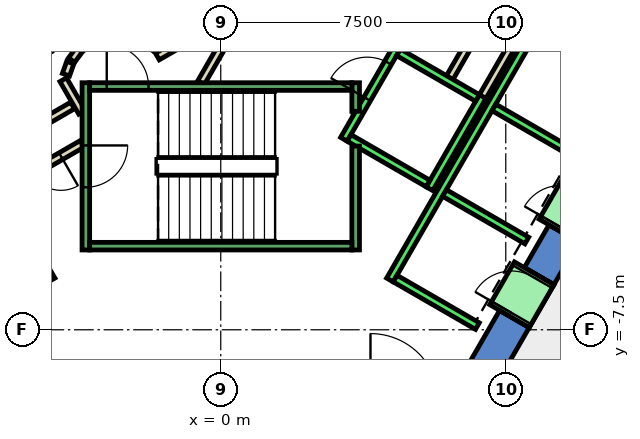
"""IFC4 building model, lengths in metres.
Left out: names, types, materials, properties, quantities, classifications, styles, units other than length and angle.
Written with IfcOpenShell. Run it as: python <this file> out.ifc"""

import sys

from ifc_helpers import new_model, si_unit, direction, frame, frame_2d, origin, place, context, subcontext, project, spatial, polyline, rectangle, outline, extrude, element, fill, save


model = new_model("IFC4")
c1 = context("Model", 3, precision=1e-05, world=origin(), true_north=direction((0.0, 1.0)))
c2 = subcontext(c1, "Body", "Model", "MODEL_VIEW")
j1 = project(units=[si_unit("LENGTHUNIT", "METRE"), si_unit("PLANEANGLEUNIT", "RADIAN")], contexts=[c1])
p1 = place(None, origin())
s1 = spatial("IfcSite", under=j1, at=p1, CompositionType="ELEMENT")
p2 = place(p1, origin())
s2 = spatial("IfcBuilding", under=s1, at=p2, CompositionType="ELEMENT")
p3 = place(p2, frame((0.0, 0.0, 95.0)))
s3 = spatial("IfcBuildingStorey", under=s2, at=p3, CompositionType="ELEMENT", Elevation=95.0)
p4 = place(p3, frame((0.0, 0.0, -0.4)))
e1 = element("IfcWall", 1, at=p4, inside=s3, PredefinedType="SHEAR", context=c2, shape_type="SweptSolid", body=[
    extrude(outline(polyline([(8.117, -7.44), (7.338, -6.99), (6.409, -8.6), (6.928, -9.5), (8.117, -7.44)])), origin(), (0.0, 0.0, 1.0), 4.2),
])
p5 = place(p3, frame((0.0, 0.0, -0.4)))
e2 = element("IfcWall", 2, at=p5, inside=s3, PredefinedType="SHEAR", context=c2, shape_type="SweptSolid", body=[
    extrude(outline(polyline([(9.417, -5.189), (8.638, -4.739), (7.988, -5.864), (8.767, -6.314), (9.417, -5.189)])), origin(), (0.0, 0.0, 1.0), 4.2),
])
p6 = place(p3, frame((0.0, 0.0, 3.6)))
e3 = element("IfcWall", 3, at=p6, inside=s3, PredefinedType="SHEAR", context=c2, shape_type="SweptSolid", body=[
    extrude(outline(polyline([(8.767, -6.314), (7.988, -5.864), (7.338, -6.99), (8.117, -7.44), (8.767, -6.314)])), origin(), (0.0, 0.0, 1.0), 0.2),
])
p7 = place(p3, frame((0.0, 0.0, 3.6)))
e4 = element("IfcWall", 4, at=p7, inside=s3, PredefinedType="SHEAR", context=c2, shape_type="SweptSolid", body=[
    extrude(outline(polyline([(10.067, -4.063), (9.288, -3.613), (8.638, -4.739), (9.417, -5.189), (10.067, -4.063)])), origin(), (0.0, 0.0, 1.0), 0.2),
])
p8 = place(p3, frame((6.826, 0.522, 0.0), z_axis=(0.0, 0.0, 1.0), x_axis=(-0.500016722714, -0.866015748706, 0.0)))
e5 = element("IfcWall", 5, at=p8, inside=s3, PredefinedType="PARTITIONING", context=c2, shape_type="SweptSolid", body=[
    extrude(rectangle(XDim=1.7, YDim=0.2, at=frame_2d((0.85, 0.0))), origin(), (0.0, 0.0, 1.0), 3.8),
])
p9 = place(p3, frame((8.192, 0.888, 0.0), z_axis=(0.0, 0.0, 1.0), x_axis=(-0.499940625693, -0.866059680843, 0.0)))
e6 = element("IfcWall", 6, at=p9, inside=s3, PredefinedType="PARTITIONING", context=c2, shape_type="SweptSolid", body=[
    extrude(rectangle(XDim=2.68, YDim=0.2, at=frame_2d((1.34, 0.0))), origin(), (0.0, 0.0, 1.0), 3.8),
])
p10 = place(p3, frame((-3.9, -1.599, 0.0), z_axis=(0.0, 0.0, 1.0), x_axis=(-0.865969445389, -0.500096910261, 0.0)))
e7 = element("IfcWall", 7, at=p10, inside=s3, PredefinedType="PARTITIONING", context=c2, shape_type="SweptSolid", body=[
    extrude(rectangle(XDim=1.373, YDim=0.2, at=frame_2d((0.687, 0.0))), origin(), (0.0, 0.0, 1.0), 3.8),
])
p11 = place(p3, frame((-3.65, -2.61, 0.0), z_axis=(0.0, 0.0, 1.0), x_axis=(-0.866072462134, -0.499918483688, 0.0)))
e8 = element("IfcWall", 8, at=p11, inside=s3, PredefinedType="PARTITIONING", context=c2, shape_type="SweptSolid", body=[
    extrude(rectangle(XDim=2.084, YDim=0.2, at=frame_2d((1.042, 0.0))), origin(), (0.0, 0.0, 1.0), 3.8),
])
p12 = place(p11, frame((0.642, 0.0, 0.0)))
e9 = element("IfcOpeningElement", 9, at=p12, cuts=e8, PredefinedType="OPENING", context=c2, shape_type="SweptSolid", body=[
    extrude(rectangle(XDim=0.9, YDim=2.1, at=frame_2d((0.45, 1.05))), frame((0.0, 0.11, 0.0), z_axis=(0.0, -1.0, 0.0), x_axis=(1.0, 0.0, 0.0)), (0.0, 0.0, 1.0), 0.22),
])
p13 = place(p3, frame((-4.145, -0.92, 0.0), z_axis=(0.0, 0.0, 1.0), x_axis=(0.499743786207, -0.866173278362, 0.0)))
e10 = element("IfcWall", 10, at=p13, inside=s3, PredefinedType="PARTITIONING", context=c2, shape_type="SweptSolid", body=[
    extrude(rectangle(XDim=0.991, YDim=0.2, at=frame_2d((0.495, 0.0))), origin(), (0.0, 0.0, 1.0), 3.8),
])
p14 = place(p3, frame((-0.52, -1.0, 0.0), z_axis=(0.0, 0.0, 1.0), x_axis=(0.50011622646, 0.865958290007, 0.0)))
e11 = element("IfcWall", 11, at=p14, inside=s3, PredefinedType="PARTITIONING", context=c2, shape_type="SweptSolid", body=[
    extrude(rectangle(XDim=4.991, YDim=0.2, at=frame_2d((2.496, 0.0))), origin(), (0.0, 0.0, 1.0), 3.8),
])
p15 = place(p14, frame((1.945, 0.0, 0.0)))
e12 = element("IfcOpeningElement", 12, at=p15, cuts=e11, PredefinedType="OPENING", context=c2, shape_type="SweptSolid", body=[
    extrude(rectangle(XDim=1.0, YDim=2.1, at=frame_2d((0.5, 1.05))), frame((0.0, 0.11, 0.0), z_axis=(0.0, -1.0, 0.0), x_axis=(1.0, 0.0, 0.0)), (0.0, 0.0, 1.0), 0.22),
])
p16 = place(p3, frame((-0.412, 0.414, 0.0), z_axis=(0.0, 0.0, 1.0), x_axis=(-0.866017369001, -0.500013916395, 0.0)))
e13 = element("IfcWall", 13, at=p16, inside=s3, PredefinedType="PARTITIONING", context=c2, shape_type="SweptSolid", body=[
    extrude(rectangle(XDim=1.45, YDim=0.2, at=frame_2d((0.725, 0.0))), origin(), (0.0, 0.0, 1.0), 3.8),
])
p17 = place(p3, frame((-3.723, -0.131, 0.0), z_axis=(0.0, 0.0, 1.0), x_axis=(-0.594675113454, -0.803966112121, 0.0)))
e14 = element("IfcWall", 14, at=p17, inside=s3, PredefinedType="PARTITIONING", context=c2, shape_type="SweptSolid", body=[
    extrude(rectangle(XDim=0.338, YDim=0.2, at=frame_2d((0.169, 0.0))), origin(), (0.0, 0.0, 1.0), 3.8),
])
p18 = place(p3, frame((-3.96, -0.47, 0.0), z_axis=(0.0, 0.0, 1.0), x_axis=(-0.334824194261, -0.942280615813, 0.0)))
e15 = element("IfcWall", 15, at=p18, inside=s3, PredefinedType="PARTITIONING", context=c2, shape_type="SweptSolid", body=[
    extrude(rectangle(XDim=0.338, YDim=0.2, at=frame_2d((0.169, 0.0))), origin(), (0.0, 0.0, 1.0), 3.8),
])
p19 = place(p3, frame((12.401, -7.621, 0.0), z_axis=(0.0, 0.0, 1.0), x_axis=(-0.499983724212, -0.866034800411, 0.0)))
e16 = element("IfcWall", 16, at=p19, inside=s3, PredefinedType="PARTITIONING", context=c2, shape_type="SweptSolid", body=[
    extrude(rectangle(XDim=9.302, YDim=0.2, at=frame_2d((4.651, 0.0))), origin(), (0.0, 0.0, 1.0), 3.8),
])
p20 = place(p3, frame((-9.751, 2.99, 0.0), z_axis=(0.0, 0.0, 1.0), x_axis=(0.50000090737, -0.866024879913, 0.0)))
e17 = element("IfcWall", 17, at=p20, inside=s3, PredefinedType="STANDARD", context=c2, shape_type="SweptSolid", body=[
    extrude(rectangle(XDim=10.6, YDim=0.2, at=frame_2d((5.3, 0.0))), origin(), (0.0, 0.0, 1.0), 3.8),
])
p21 = place(p3, frame((3.24, -2.488, 0.0), z_axis=(0.0, 0.0, 1.0), x_axis=(0.49994636267, 0.866056369097, 0.0)))
e18 = element("IfcWall", 18, at=p21, inside=s3, PredefinedType="STANDARD", context=c2, shape_type="SweptSolid", body=[
    extrude(rectangle(XDim=2.8, YDim=0.2, at=frame_2d((1.4, 0.0))), origin(), (0.0, 0.0, 1.0), 3.8),
])
p22 = place(p21, frame((1.225, 0.0, 0.0)))
e19 = element("IfcOpeningElement", 19, at=p22, cuts=e18, PredefinedType="OPENING", context=c2, shape_type="SweptSolid", body=[
    extrude(rectangle(XDim=1.1, YDim=2.1, at=frame_2d((0.55, 1.05))), frame((0.0, 0.11, 0.0), z_axis=(0.0, -1.0, 0.0), x_axis=(1.0, 0.0, 0.0)), (0.0, 0.0, 1.0), 0.22),
])
p23 = place(p3, frame((5.492, -3.788, 0.0), z_axis=(0.0, 0.0, 1.0), x_axis=(0.500011755427, 0.866018616679, 0.0)))
e20 = element("IfcWall", 20, at=p23, inside=s3, PredefinedType="STANDARD", context=c2, shape_type="SweptSolid", body=[
    extrude(rectangle(XDim=2.8, YDim=0.2, at=frame_2d((1.4, 0.0))), origin(), (0.0, 0.0, 1.0), 3.8),
])
p24 = place(p3, frame((3.377, -2.452, 0.0), z_axis=(0.0, 0.0, 1.0), x_axis=(0.865955154139, -0.50012165622, 0.0)))
e21 = element("IfcWall", 21, at=p24, inside=s3, PredefinedType="STANDARD", context=c2, shape_type="SweptSolid", body=[
    extrude(rectangle(XDim=2.4, YDim=0.2, at=frame_2d((1.2, 0.0))), origin(), (0.0, 0.0, 1.0), 3.8),
])
p25 = place(p3, frame((4.677, -0.2, 0.0), z_axis=(0.0, 0.0, 1.0), x_axis=(0.865973769406, -0.500089422704, 0.0)))
e22 = element("IfcWall", 22, at=p25, inside=s3, PredefinedType="STANDARD", context=c2, shape_type="SweptSolid", body=[
    extrude(rectangle(XDim=2.399, YDim=0.2, at=frame_2d((1.2, 0.0))), origin(), (0.0, 0.0, 1.0), 3.8),
])
p26 = place(p3, frame((4.451, -6.19, 0.0), z_axis=(0.0, 0.0, 1.0), x_axis=(0.50000090737, 0.866024879913, 0.0)))
e23 = element("IfcWall", 23, at=p26, inside=s3, PredefinedType="STANDARD", context=c2, shape_type="SweptSolid", body=[
    extrude(rectangle(XDim=10.6, YDim=0.2, at=frame_2d((5.3, 0.0))), origin(), (0.0, 0.0, 1.0), 3.8),
])
for number, where, z_axis, x_axis in (
    (24, (4.588, -6.153, 0.0), (0.0, 0.0, 1.0), (0.866, -0.5, 0.0)),
    (25, (5.888, -3.902, 0.0), (0.0, 0.0, 1.0), (0.866, -0.5, 0.0)),
    (26, (7.188, -1.65, 0.0), (0.0, 0.0, 1.0), (0.866, -0.5, 0.0)),
    (27, (8.488, 0.602, 0.0), (0.0, 0.0, 1.0), (0.866, -0.5, 0.0)),
):
    element("IfcWall", number, at=place(p3, frame(where, z_axis=z_axis, x_axis=x_axis)), inside=s3, PredefinedType="STANDARD", context=c2, shape_type="SweptSolid", body=[
        extrude(rectangle(XDim=2.5, YDim=0.2, at=frame_2d((1.25, 0.0))), origin(), (0.0, 0.0, 1.0), 3.8),
    ])
p27 = place(p3, frame((7.598, -7.14, 0.0), z_axis=(0.0, 0.0, 1.0), x_axis=(0.500362116554, 0.865816234728, 0.0)))
e28 = element("IfcWall", 28, at=p27, inside=s3, PredefinedType="STANDARD", context=c2, shape_type="SweptSolid", body=[
    extrude(rectangle(XDim=1.299, YDim=1.2, at=frame_2d((0.65, 0.0))), origin(), (0.0, 0.0, 1.0), 2.4),
])
p28 = place(p27, frame((0.1, 0.0, 0.0)))
e29 = element("IfcOpeningElement", 29, at=p28, cuts=e28, PredefinedType="OPENING", context=c2, shape_type="SweptSolid", body=[
    extrude(rectangle(XDim=1.1, YDim=2.3, at=frame_2d((0.55, 1.15))), frame((0.0, 0.61, 0.0), z_axis=(0.0, -1.0, 0.0), x_axis=(1.0, 0.0, 0.0)), (0.0, 0.0, 1.0), 1.22),
])
p29 = place(p3, frame((8.898, -4.889, 0.0), z_axis=(0.0, 0.0, 1.0), x_axis=(0.500036693733, 0.866004217611, 0.0)))
e30 = element("IfcWall", 30, at=p29, inside=s3, PredefinedType="STANDARD", context=c2, shape_type="SweptSolid", body=[
    extrude(rectangle(XDim=1.3, YDim=1.2, at=frame_2d((0.65, 0.0))), origin(), (0.0, 0.0, 1.0), 2.4),
])
p30 = place(p29, frame((0.1, 0.0, 0.0)))
e31 = element("IfcOpeningElement", 31, at=p30, cuts=e30, PredefinedType="OPENING", context=c2, shape_type="SweptSolid", body=[
    extrude(rectangle(XDim=1.1, YDim=2.3, at=frame_2d((0.55, 1.15))), frame((0.0, 0.61, 0.0), z_axis=(0.0, -1.0, 0.0), x_axis=(1.0, 0.0, 0.0)), (0.0, 0.0, 1.0), 1.22),
])
p31 = place(p3, frame((-3.55, -1.0, 0.0), z_axis=(0.0, 0.0, 1.0), x_axis=(0.0, -1.0, 0.0)))
e32 = element("IfcWall", 32, at=p31, inside=s3, PredefinedType="STANDARD", context=c2, shape_type="SweptSolid", body=[
    extrude(rectangle(XDim=4.4, YDim=0.2, at=frame_2d((2.2, 0.0))), origin(), (0.0, 0.0, 1.0), 3.8),
])
p32 = place(p31, frame((1.65, 0.0, 0.0)))
e33 = element("IfcOpeningElement", 33, at=p32, cuts=e32, PredefinedType="OPENING", context=c2, shape_type="SweptSolid", body=[
    extrude(rectangle(XDim=1.1, YDim=2.2, at=frame_2d((0.55, 1.1))), frame((0.0, 0.11, 0.0), z_axis=(0.0, -1.0, 0.0), x_axis=(1.0, 0.0, 0.0)), (0.0, 0.0, 1.0), 0.22),
])
p33 = place(p3, frame((3.55, -2.667, 0.0), z_axis=(0.0, 0.0, 1.0), x_axis=(0.0, -1.0, 0.0)))
e34 = element("IfcWall", 34, at=p33, inside=s3, PredefinedType="STANDARD", context=c2, shape_type="SweptSolid", body=[
    extrude(rectangle(XDim=2.733, YDim=0.2, at=frame_2d((1.366, 0.0))), origin(), (0.0, 0.0, 1.0), 3.8),
])
p34 = place(p3, frame((3.55, -1.0, 0.0), z_axis=(0.0, 0.0, 1.0), x_axis=(0.0, -1.0, 0.0)))
e35 = element("IfcWall", 35, at=p34, inside=s3, PredefinedType="STANDARD", context=c2, shape_type="SweptSolid", body=[
    extrude(rectangle(XDim=0.751, YDim=0.2, at=frame_2d((0.375, 0.0))), origin(), (0.0, 0.0, 1.0), 3.8),
])
p35 = place(p3, frame((-3.45, -1.1, 0.0), z_axis=(0.0, 0.0, 1.0), x_axis=(1.0, 0.0, 0.0)))
e36 = element("IfcWall", 36, at=p35, inside=s3, PredefinedType="STANDARD", context=c2, shape_type="SweptSolid", body=[
    extrude(rectangle(XDim=6.9, YDim=0.2, at=frame_2d((3.45, 0.0))), origin(), (0.0, 0.0, 1.0), 3.8),
])
p36 = place(p35, frame((0.45, 0.0, 0.0)))
e37 = element("IfcOpeningElement", 37, at=p36, cuts=e36, PredefinedType="OPENING", context=c2, shape_type="SweptSolid", body=[
    extrude(rectangle(XDim=1.1, YDim=2.2, at=frame_2d((0.55, 1.1))), frame((0.0, 0.11, 0.0), z_axis=(0.0, -1.0, 0.0), x_axis=(1.0, 0.0, 0.0)), (0.0, 0.0, 1.0), 0.22),
])
p37 = place(p3, frame((-3.45, -5.3, 0.0), z_axis=(0.0, 0.0, 1.0), x_axis=(1.0, 0.0, 0.0)))
e38 = element("IfcWall", 38, at=p37, inside=s3, PredefinedType="STANDARD", context=c2, shape_type="SweptSolid", body=[
    extrude(rectangle(XDim=6.9, YDim=0.2, at=frame_2d((3.45, 0.0))), origin(), (0.0, 0.0, 1.0), 3.8),
])
p38 = place(p12, origin())
e39 = element("IfcDoor", 39, at=p38, inside=s3, OperationType="SINGLE_SWING_LEFT", PredefinedType="DOOR", context=c2, shape_type="SweptSolid", body=[
    extrude(rectangle(XDim=0.9, YDim=2.1, at=frame_2d((0.45, 1.05))), frame((0.0, 0.025, 0.0), z_axis=(0.0, -1.0, 0.0), x_axis=(1.0, 0.0, 0.0)), (0.0, 0.0, 1.0), 0.05),
])
fill(e9, e39)
p39 = place(p28, origin())
e40 = element("IfcDoor", 40, at=p39, inside=s3, OperationType="SLIDING_TO_LEFT", PredefinedType="DOOR", context=c2, shape_type="SweptSolid", body=[
    extrude(rectangle(XDim=1.1, YDim=2.3, at=frame_2d((0.55, 1.15))), frame((0.0, 0.025, 0.0), z_axis=(0.0, -1.0, 0.0), x_axis=(1.0, 0.0, 0.0)), (0.0, 0.0, 1.0), 0.05),
])
fill(e29, e40)
p40 = place(p22, origin())
e41 = element("IfcDoor", 41, at=p40, inside=s3, OperationType="SLIDING_TO_LEFT", PredefinedType="DOOR", context=c2, shape_type="SweptSolid", body=[
    extrude(rectangle(XDim=1.1, YDim=2.1, at=frame_2d((0.55, 1.05))), frame((0.0, 0.025, 0.0), z_axis=(0.0, -1.0, 0.0), x_axis=(1.0, 0.0, 0.0)), (0.0, 0.0, 1.0), 0.05),
])
fill(e19, e41)
p41 = place(p36, origin())
e42 = element("IfcDoor", 42, at=p41, inside=s3, OperationType="SINGLE_SWING_LEFT", PredefinedType="DOOR", context=c2, shape_type="SweptSolid", body=[
    extrude(rectangle(XDim=1.1, YDim=2.2, at=frame_2d((0.55, 1.1))), frame((0.0, 0.025, 0.0), z_axis=(0.0, -1.0, 0.0), x_axis=(1.0, 0.0, 0.0)), (0.0, 0.0, 1.0), 0.05),
])
fill(e37, e42)
p42 = place(p32, origin())
e43 = element("IfcDoor", 43, at=p42, inside=s3, OperationType="SINGLE_SWING_LEFT", PredefinedType="DOOR", context=c2, shape_type="SweptSolid", body=[
    extrude(rectangle(XDim=1.1, YDim=2.2, at=frame_2d((0.55, 1.1))), frame((0.0, 0.025, 0.0), z_axis=(0.0, -1.0, 0.0), x_axis=(1.0, 0.0, 0.0)), (0.0, 0.0, 1.0), 0.05),
])
fill(e33, e43)
save(model, sys.argv[1])
